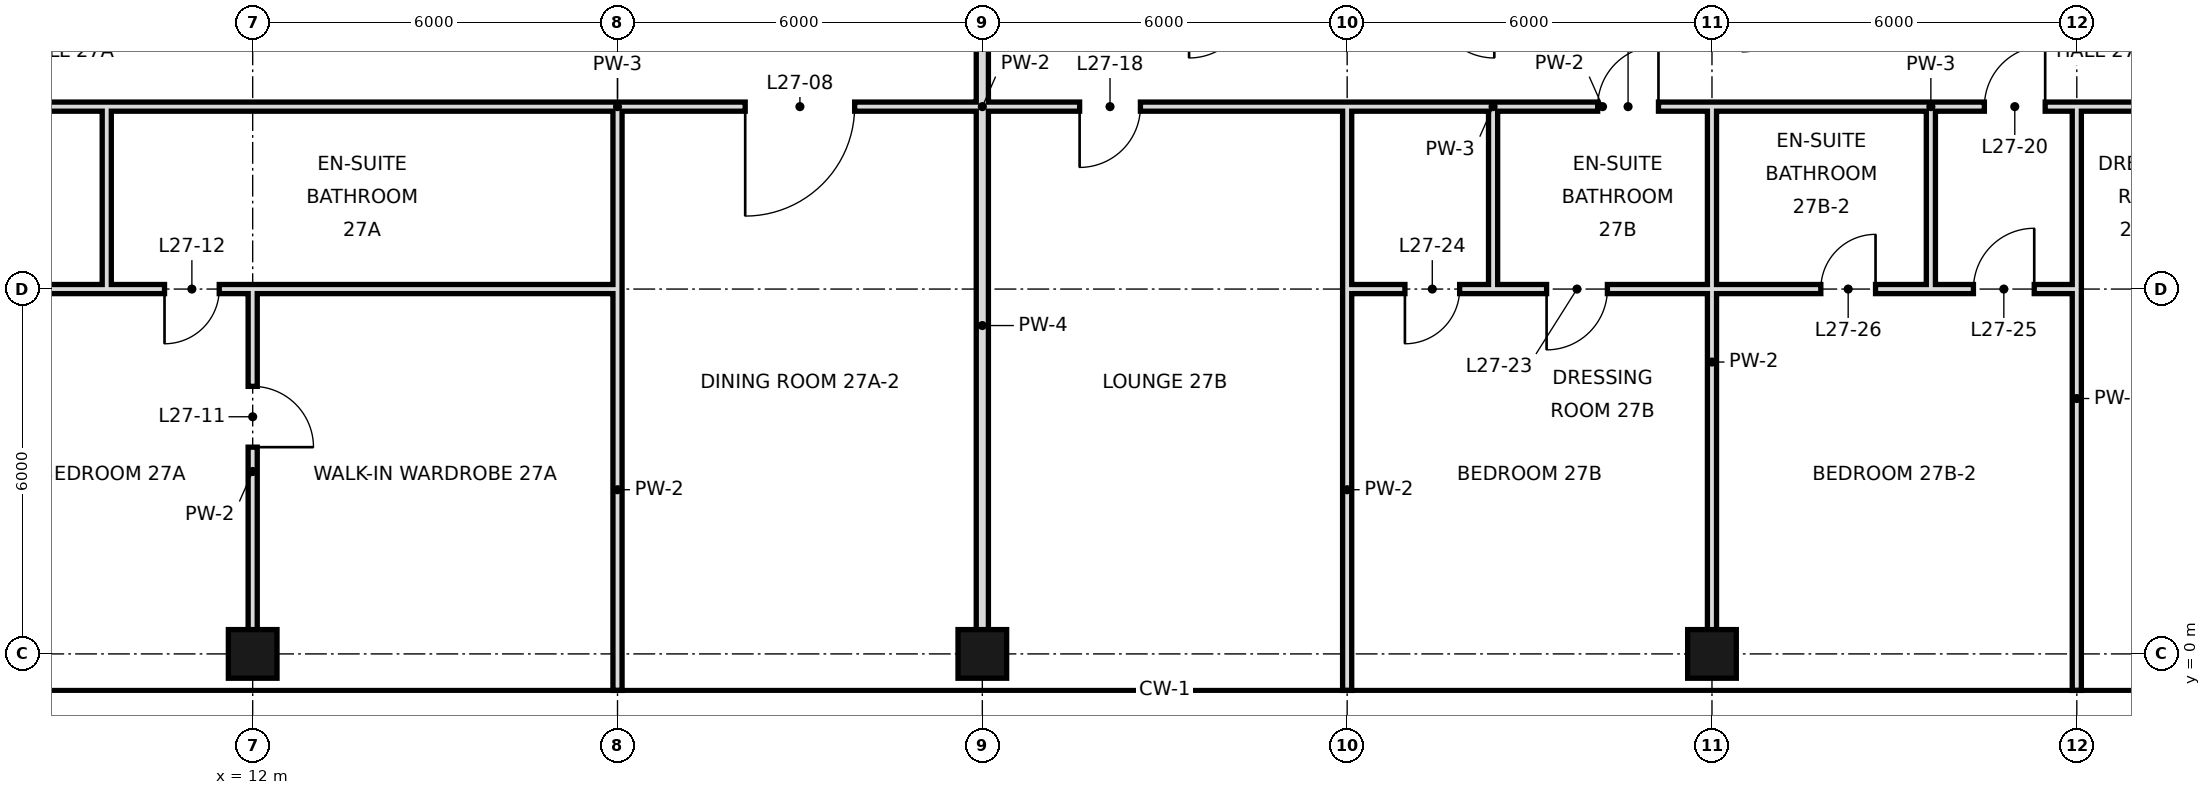
"""IFC4 building model, lengths in metres.
Left out: names, types, materials, properties, quantities, classifications, styles, units other than length and angle.
Written with IfcOpenShell. Run it as: python <this file> out.ifc"""

import sys

from ifc_helpers import new_model, si_unit, direction, frame, frame_2d, origin, origin_2d, place, context, subcontext, project, spatial, rectangle, hollow_rectangle, extrude, element, fill, save


model = new_model("IFC4")
c1 = context("Model", 3, precision=1e-05, world=origin(), true_north=direction((0.0, 1.0)))
c2 = subcontext(c1, "Body", "Model", "MODEL_VIEW")
j1 = project(units=[si_unit("LENGTHUNIT", "METRE"), si_unit("PLANEANGLEUNIT", "RADIAN")], contexts=[c1])
p1 = place(None, origin())
s1 = spatial("IfcSite", under=j1, at=p1, CompositionType="ELEMENT")
p2 = place(p1, origin())
s2 = spatial("IfcBuilding", under=s1, at=p2, CompositionType="ELEMENT")
p3 = place(p2, frame((0.0, 0.0, 123.2)))
s3 = spatial("IfcBuildingStorey", under=s2, at=p3, CompositionType="ELEMENT", Elevation=123.2)
for number, where, z_axis, x_axis in (
    (1, (12.0, 0.0, 0.0), (0.0, 0.0, 1.0), (1.0, 0.0, 0.0)),
    (2, (24.0, 0.0, 0.0), (0.0, 0.0, 1.0), (1.0, 0.0, 0.0)),
    (3, (36.0, 0.0, 0.0), (0.0, 0.0, 1.0), (1.0, 0.0, 0.0)),
):
    element("IfcColumn", number, at=place(p3, frame(where, z_axis=z_axis, x_axis=x_axis)), inside=s3, PredefinedType="COLUMN", context=c2, shape_type="SweptSolid", body=[
        extrude(hollow_rectangle(XDim=0.8, YDim=0.8, WallThickness=0.04, at=origin_2d()), origin(), (0.0, 0.0, 1.0), 3.6),
    ])
p4 = place(p3, frame((12.0, 0.0, 0.0), z_axis=(0.0, 0.0, 1.0), x_axis=(0.0, 1.0, 0.0)))
e4 = element("IfcWall", 4, at=p4, inside=s3, PredefinedType="PARTITIONING", context=c2, shape_type="SweptSolid", body=[
    extrude(rectangle(XDim=6.0, YDim=0.15, at=frame_2d((3.0, 0.0))), origin(), (0.0, 0.0, 1.0), 2.72),
])
p5 = place(p4, frame((3.4, 0.0, 0.0)))
e5 = element("IfcOpeningElement", 5, at=p5, cuts=e4, PredefinedType="OPENING", context=c2, shape_type="SweptSolid", body=[
    extrude(rectangle(XDim=1.0, YDim=2.4, at=frame_2d((0.5, 1.2))), frame((0.0, 0.085, 0.0), z_axis=(0.0, -1.0, 0.0), x_axis=(1.0, 0.0, 0.0)), (0.0, 0.0, 1.0), 0.17),
])
p6 = place(p3, frame((18.0, -0.6, 0.0), z_axis=(0.0, 0.0, 1.0), x_axis=(0.0, 1.0, 0.0)))
e6 = element("IfcWall", 6, at=p6, inside=s3, PredefinedType="PARTITIONING", context=c2, shape_type="SweptSolid", body=[
    extrude(rectangle(XDim=6.6, YDim=0.15, at=frame_2d((3.3, 0.0))), origin(), (0.0, 0.0, 1.0), 2.72),
])
p7 = place(p3, frame((18.0, 6.0, 0.0), z_axis=(0.0, 0.0, 1.0), x_axis=(0.0, 1.0, 0.0)))
e7 = element("IfcWall", 7, at=p7, inside=s3, PredefinedType="PARTITIONING", context=c2, shape_type="SweptSolid", body=[
    extrude(rectangle(XDim=3.0, YDim=0.15, at=frame_2d((1.5, 0.0))), origin(), (0.0, 0.0, 1.0), 2.72),
])
p8 = place(p3, frame((24.0, 0.0, 0.0), z_axis=(0.0, 0.0, 1.0), x_axis=(0.0, 1.0, 0.0)))
e8 = element("IfcWall", 8, at=p8, inside=s3, PredefinedType="SOLIDWALL", context=c2, shape_type="SweptSolid", body=[
    extrude(rectangle(XDim=10.8, YDim=0.2, at=frame_2d((5.4, 0.0))), origin(), (0.0, 0.0, 1.0), 2.72),
])
p9 = place(p3, frame((30.0, -0.6, 0.0), z_axis=(0.0, 0.0, 1.0), x_axis=(0.0, 1.0, 0.0)))
e9 = element("IfcWall", 9, at=p9, inside=s3, PredefinedType="PARTITIONING", context=c2, shape_type="SweptSolid", body=[
    extrude(rectangle(XDim=6.6, YDim=0.15, at=frame_2d((3.3, 0.0))), origin(), (0.0, 0.0, 1.0), 2.72),
])
p10 = place(p3, frame((30.0, 6.0, 0.0), z_axis=(0.0, 0.0, 1.0), x_axis=(0.0, 1.0, 0.0)))
e10 = element("IfcWall", 10, at=p10, inside=s3, PredefinedType="PARTITIONING", context=c2, shape_type="SweptSolid", body=[
    extrude(rectangle(XDim=3.0, YDim=0.15, at=frame_2d((1.5, 0.0))), origin(), (0.0, 0.0, 1.0), 2.72),
])
p11 = place(p3, frame((32.4, 6.0, 0.0), z_axis=(0.0, 0.0, 1.0), x_axis=(0.0, 1.0, 0.0)))
e11 = element("IfcWall", 11, at=p11, inside=s3, PredefinedType="PARTITIONING", context=c2, shape_type="SweptSolid", body=[
    extrude(rectangle(XDim=3.0, YDim=0.15, at=frame_2d((1.5, 0.0))), origin(), (0.0, 0.0, 1.0), 3.42),
])
p12 = place(p3, frame((36.0, 0.0, 0.0), z_axis=(0.0, 0.0, 1.0), x_axis=(0.0, 1.0, 0.0)))
e12 = element("IfcWall", 12, at=p12, inside=s3, PredefinedType="PARTITIONING", context=c2, shape_type="SweptSolid", body=[
    extrude(rectangle(XDim=6.0, YDim=0.15, at=frame_2d((3.0, 0.0))), origin(), (0.0, 0.0, 1.0), 2.72),
])
p13 = place(p3, frame((36.0, 6.0, 0.0), z_axis=(0.0, 0.0, 1.0), x_axis=(0.0, 1.0, 0.0)))
e13 = element("IfcWall", 13, at=p13, inside=s3, PredefinedType="PARTITIONING", context=c2, shape_type="SweptSolid", body=[
    extrude(rectangle(XDim=3.0, YDim=0.15, at=frame_2d((1.5, 0.0))), origin(), (0.0, 0.0, 1.0), 2.72),
])
p14 = place(p3, frame((39.6, 6.0, 0.0), z_axis=(0.0, 0.0, 1.0), x_axis=(0.0, 1.0, 0.0)))
e14 = element("IfcWall", 14, at=p14, inside=s3, PredefinedType="PARTITIONING", context=c2, shape_type="SweptSolid", body=[
    extrude(rectangle(XDim=3.0, YDim=0.15, at=frame_2d((1.5, 0.0))), origin(), (0.0, 0.0, 1.0), 3.42),
])
p15 = place(p3, frame((42.0, -0.6, 0.0), z_axis=(0.0, 0.0, 1.0), x_axis=(0.0, 1.0, 0.0)))
e15 = element("IfcWall", 15, at=p15, inside=s3, PredefinedType="PARTITIONING", context=c2, shape_type="SweptSolid", body=[
    extrude(rectangle(XDim=9.6, YDim=0.15, at=frame_2d((4.8, 0.0))), origin(), (0.0, 0.0, 1.0), 2.72),
])
p16 = place(p3, frame((9.6, 6.0, 0.0), z_axis=(0.0, 0.0, 1.0), x_axis=(0.0, 1.0, 0.0)))
e16 = element("IfcWall", 16, at=p16, inside=s3, PredefinedType="PARTITIONING", context=c2, shape_type="SweptSolid", body=[
    extrude(rectangle(XDim=3.0, YDim=0.15, at=frame_2d((1.5, 0.0))), origin(), (0.0, 0.0, 1.0), 3.42),
])
p17 = place(p3, frame((-6.0, 6.0, 0.0), z_axis=(0.0, 0.0, 1.0), x_axis=(1.0, 0.0, 0.0)))
e17 = element("IfcWall", 17, at=p17, inside=s3, PredefinedType="PARTITIONING", context=c2, shape_type="SweptSolid", body=[
    extrude(rectangle(XDim=15.6, YDim=0.15, at=frame_2d((7.8, 0.0))), origin(), (0.0, 0.0, 1.0), 2.97),
])
p18 = place(p17, frame((3.16, 0.0, 0.0)))
e18 = element("IfcOpeningElement", 18, at=p18, cuts=e17, PredefinedType="OPENING", context=c2, shape_type="SweptSolid", body=[
    extrude(rectangle(XDim=1.8, YDim=2.4, at=frame_2d((0.9, 1.2))), frame((0.0, 0.085, 0.0), z_axis=(0.0, -1.0, 0.0), x_axis=(1.0, 0.0, 0.0)), (0.0, 0.0, 1.0), 0.17),
])
p19 = place(p17, frame((12.88, 0.0, 0.0)))
e19 = element("IfcOpeningElement", 19, at=p19, cuts=e17, PredefinedType="OPENING", context=c2, shape_type="SweptSolid", body=[
    extrude(rectangle(XDim=1.0, YDim=2.4, at=frame_2d((0.5, 1.2))), frame((0.0, 0.085, 0.0), z_axis=(0.0, -1.0, 0.0), x_axis=(1.0, 0.0, 0.0)), (0.0, 0.0, 1.0), 0.17),
])
p20 = place(p3, frame((32.4, 6.0, 0.0), z_axis=(0.0, 0.0, 1.0), x_axis=(1.0, 0.0, 0.0)))
e20 = element("IfcWall", 20, at=p20, inside=s3, PredefinedType="PARTITIONING", context=c2, shape_type="SweptSolid", body=[
    extrude(rectangle(XDim=3.6, YDim=0.15, at=frame_2d((1.8, 0.0))), origin(), (0.0, 0.0, 1.0), 2.97),
])
p21 = place(p20, frame((0.88, 0.0, 0.0)))
e21 = element("IfcOpeningElement", 21, at=p21, cuts=e20, PredefinedType="OPENING", context=c2, shape_type="SweptSolid", body=[
    extrude(rectangle(XDim=1.0, YDim=2.4, at=frame_2d((0.5, 1.2))), frame((0.0, 0.085, 0.0), z_axis=(0.0, -1.0, 0.0), x_axis=(1.0, 0.0, 0.0)), (0.0, 0.0, 1.0), 0.17),
])
p22 = place(p3, frame((39.6, 6.0, 0.0), z_axis=(0.0, 0.0, 1.0), x_axis=(1.0, 0.0, 0.0)))
e22 = element("IfcWall", 22, at=p22, inside=s3, PredefinedType="PARTITIONING", context=c2, shape_type="SweptSolid", body=[
    extrude(rectangle(XDim=2.4, YDim=0.15, at=frame_2d((1.2, 0.0))), origin(), (0.0, 0.0, 1.0), 2.97),
])
p23 = place(p22, frame((0.7, 0.0, 0.0)))
e23 = element("IfcOpeningElement", 23, at=p23, cuts=e22, PredefinedType="OPENING", context=c2, shape_type="SweptSolid", body=[
    extrude(rectangle(XDim=1.0, YDim=2.4, at=frame_2d((0.5, 1.2))), frame((0.0, 0.085, 0.0), z_axis=(0.0, -1.0, 0.0), x_axis=(1.0, 0.0, 0.0)), (0.0, 0.0, 1.0), 0.17),
])
p24 = place(p3, frame((9.6, 6.0, 0.0), z_axis=(0.0, 0.0, 1.0), x_axis=(1.0, 0.0, 0.0)))
e24 = element("IfcWall", 24, at=p24, inside=s3, PredefinedType="PARTITIONING", context=c2, shape_type="SweptSolid", body=[
    extrude(rectangle(XDim=8.4, YDim=0.15, at=frame_2d((4.2, 0.0))), origin(), (0.0, 0.0, 1.0), 2.97),
])
p25 = place(p24, frame((0.95, 0.0, 0.0)))
e25 = element("IfcOpeningElement", 25, at=p25, cuts=e24, PredefinedType="OPENING", context=c2, shape_type="SweptSolid", body=[
    extrude(rectangle(XDim=0.9, YDim=2.4, at=frame_2d((0.45, 1.2))), frame((0.0, 0.085, 0.0), z_axis=(0.0, -1.0, 0.0), x_axis=(1.0, 0.0, 0.0)), (0.0, 0.0, 1.0), 0.17),
])
p26 = place(p3, frame((30.0, 6.0, 0.0), z_axis=(0.0, 0.0, 1.0), x_axis=(1.0, 0.0, 0.0)))
e26 = element("IfcWall", 26, at=p26, inside=s3, PredefinedType="PARTITIONING", context=c2, shape_type="SweptSolid", body=[
    extrude(rectangle(XDim=2.4, YDim=0.15, at=frame_2d((1.2, 0.0))), origin(), (0.0, 0.0, 1.0), 2.97),
])
p27 = place(p26, frame((0.95, 0.0, 0.0)))
e27 = element("IfcOpeningElement", 27, at=p27, cuts=e26, PredefinedType="OPENING", context=c2, shape_type="SweptSolid", body=[
    extrude(rectangle(XDim=0.9, YDim=2.4, at=frame_2d((0.45, 1.2))), frame((0.0, 0.085, 0.0), z_axis=(0.0, -1.0, 0.0), x_axis=(1.0, 0.0, 0.0)), (0.0, 0.0, 1.0), 0.17),
])
p28 = place(p3, frame((36.0, 6.0, 0.0), z_axis=(0.0, 0.0, 1.0), x_axis=(1.0, 0.0, 0.0)))
e28 = element("IfcWall", 28, at=p28, inside=s3, PredefinedType="PARTITIONING", context=c2, shape_type="SweptSolid", body=[
    extrude(rectangle(XDim=3.6, YDim=0.15, at=frame_2d((1.8, 0.0))), origin(), (0.0, 0.0, 1.0), 2.97),
])
p29 = place(p28, frame((1.79, 0.0, 0.0)))
e29 = element("IfcOpeningElement", 29, at=p29, cuts=e28, PredefinedType="OPENING", context=c2, shape_type="SweptSolid", body=[
    extrude(rectangle(XDim=0.9, YDim=2.4, at=frame_2d((0.45, 1.2))), frame((0.0, 0.085, 0.0), z_axis=(0.0, -1.0, 0.0), x_axis=(1.0, 0.0, 0.0)), (0.0, 0.0, 1.0), 0.17),
])
p30 = place(p3, frame((-6.6, 9.0, 0.0), z_axis=(0.0, 0.0, 1.0), x_axis=(1.0, 0.0, 0.0)))
e30 = element("IfcWall", 30, at=p30, inside=s3, PredefinedType="PARTITIONING", context=c2, shape_type="SweptSolid", body=[
    extrude(rectangle(XDim=16.2, YDim=0.15, at=frame_2d((8.1, 0.0))), origin(), (0.0, 0.0, 1.0), 3.42),
])
p31 = place(p30, frame((5.7, 0.0, 0.0)))
e31 = element("IfcOpeningElement", 31, at=p31, cuts=e30, PredefinedType="OPENING", context=c2, shape_type="SweptSolid", body=[
    extrude(rectangle(XDim=1.8, YDim=2.4, at=frame_2d((0.9, 1.2))), frame((0.0, 0.085, 0.0), z_axis=(0.0, -1.0, 0.0), x_axis=(1.0, 0.0, 0.0)), (0.0, 0.0, 1.0), 0.17),
])
p32 = place(p30, frame((13.48, 0.0, 0.0)))
e32 = element("IfcOpeningElement", 32, at=p32, cuts=e30, PredefinedType="OPENING", context=c2, shape_type="SweptSolid", body=[
    extrude(rectangle(XDim=1.0, YDim=2.4, at=frame_2d((0.5, 1.2))), frame((0.0, 0.085, 0.0), z_axis=(0.0, -1.0, 0.0), x_axis=(1.0, 0.0, 0.0)), (0.0, 0.0, 1.0), 0.17),
])
p33 = place(p3, frame((18.0, 9.0, 0.0), z_axis=(0.0, 0.0, 1.0), x_axis=(1.0, 0.0, 0.0)))
e33 = element("IfcWall", 33, at=p33, inside=s3, PredefinedType="PARTITIONING", context=c2, shape_type="SweptSolid", body=[
    extrude(rectangle(XDim=12.0, YDim=0.15, at=frame_2d((6.0, 0.0))), origin(), (0.0, 0.0, 1.0), 3.42),
])
p34 = place(p33, frame((2.1, 0.0, 0.0)))
e34 = element("IfcOpeningElement", 34, at=p34, cuts=e33, PredefinedType="OPENING", context=c2, shape_type="SweptSolid", body=[
    extrude(rectangle(XDim=1.8, YDim=2.4, at=frame_2d((0.9, 1.2))), frame((0.0, 0.085, 0.0), z_axis=(0.0, -1.0, 0.0), x_axis=(1.0, 0.0, 0.0)), (0.0, 0.0, 1.0), 0.17),
])
p35 = place(p33, frame((7.6, 0.0, 0.0)))
e35 = element("IfcOpeningElement", 35, at=p35, cuts=e33, PredefinedType="OPENING", context=c2, shape_type="SweptSolid", body=[
    extrude(rectangle(XDim=1.0, YDim=2.4, at=frame_2d((0.5, 1.2))), frame((0.0, 0.085, 0.0), z_axis=(0.0, -1.0, 0.0), x_axis=(1.0, 0.0, 0.0)), (0.0, 0.0, 1.0), 0.17),
])
p36 = place(p3, frame((32.4, 9.0, 0.0), z_axis=(0.0, 0.0, 1.0), x_axis=(1.0, 0.0, 0.0)))
e36 = element("IfcWall", 36, at=p36, inside=s3, PredefinedType="PARTITIONING", context=c2, shape_type="SweptSolid", body=[
    extrude(rectangle(XDim=3.6, YDim=0.15, at=frame_2d((1.8, 0.0))), origin(), (0.0, 0.0, 1.0), 3.42),
])
p37 = place(p36, frame((1.72, 0.0, 0.0)))
e37 = element("IfcOpeningElement", 37, at=p37, cuts=e36, PredefinedType="OPENING", context=c2, shape_type="SweptSolid", body=[
    extrude(rectangle(XDim=1.0, YDim=2.4, at=frame_2d((0.5, 1.2))), frame((0.0, 0.085, 0.0), z_axis=(0.0, -1.0, 0.0), x_axis=(1.0, 0.0, 0.0)), (0.0, 0.0, 1.0), 0.17),
])
p38 = place(p3, frame((39.6, 9.0, 0.0), z_axis=(0.0, 0.0, 1.0), x_axis=(1.0, 0.0, 0.0)))
e38 = element("IfcWall", 38, at=p38, inside=s3, PredefinedType="PARTITIONING", context=c2, shape_type="SweptSolid", body=[
    extrude(rectangle(XDim=21.0, YDim=0.15, at=frame_2d((10.5, 0.0))), origin(), (0.0, 0.0, 1.0), 3.42),
])
p39 = place(p38, frame((0.88, 0.0, 0.0)))
e39 = element("IfcOpeningElement", 39, at=p39, cuts=e38, PredefinedType="OPENING", context=c2, shape_type="SweptSolid", body=[
    extrude(rectangle(XDim=1.0, YDim=2.4, at=frame_2d((0.5, 1.2))), frame((0.0, 0.085, 0.0), z_axis=(0.0, -1.0, 0.0), x_axis=(1.0, 0.0, 0.0)), (0.0, 0.0, 1.0), 0.17),
])
p40 = place(p38, frame((4.9, 0.0, 0.0)))
e40 = element("IfcOpeningElement", 40, at=p40, cuts=e38, PredefinedType="OPENING", context=c2, shape_type="SweptSolid", body=[
    extrude(rectangle(XDim=1.0, YDim=2.4, at=frame_2d((0.5, 1.2))), frame((0.0, 0.085, 0.0), z_axis=(0.0, -1.0, 0.0), x_axis=(1.0, 0.0, 0.0)), (0.0, 0.0, 1.0), 0.17),
])
p41 = place(p38, frame((8.65, 0.0, 0.0)))
e41 = element("IfcOpeningElement", 41, at=p41, cuts=e38, PredefinedType="OPENING", context=c2, shape_type="SweptSolid", body=[
    extrude(rectangle(XDim=1.8, YDim=2.4, at=frame_2d((0.9, 1.2))), frame((0.0, 0.085, 0.0), z_axis=(0.0, -1.0, 0.0), x_axis=(1.0, 0.0, 0.0)), (0.0, 0.0, 1.0), 0.17),
])
p42 = place(p3, frame((9.6, 9.0, 0.0), z_axis=(0.0, 0.0, 1.0), x_axis=(1.0, 0.0, 0.0)))
e42 = element("IfcWall", 42, at=p42, inside=s3, PredefinedType="PARTITIONING", context=c2, shape_type="SweptSolid", body=[
    extrude(rectangle(XDim=8.4, YDim=0.15, at=frame_2d((4.2, 0.0))), origin(), (0.0, 0.0, 1.0), 3.42),
])
p43 = place(p3, frame((30.0, 9.0, 0.0), z_axis=(0.0, 0.0, 1.0), x_axis=(1.0, 0.0, 0.0)))
e43 = element("IfcWall", 43, at=p43, inside=s3, PredefinedType="PARTITIONING", context=c2, shape_type="SweptSolid", body=[
    extrude(rectangle(XDim=2.4, YDim=0.15, at=frame_2d((1.2, 0.0))), origin(), (0.0, 0.0, 1.0), 3.42),
])
p44 = place(p3, frame((36.0, 9.0, 0.0), z_axis=(0.0, 0.0, 1.0), x_axis=(1.0, 0.0, 0.0)))
e44 = element("IfcWall", 44, at=p44, inside=s3, PredefinedType="PARTITIONING", context=c2, shape_type="SweptSolid", body=[
    extrude(rectangle(XDim=3.6, YDim=0.15, at=frame_2d((1.8, 0.0))), origin(), (0.0, 0.0, 1.0), 3.42),
])
p45 = place(p34, frame((1.8, 0.0, 0.0), z_axis=(0.0, 0.0, 1.0), x_axis=(-1.0, 0.0, 0.0)))
e45 = element("IfcDoor", 45, at=p45, inside=s3, OperationType="SINGLE_SWING_RIGHT", PredefinedType="DOOR", context=c2, shape_type="SweptSolid", body=[
    extrude(rectangle(XDim=1.8, YDim=2.4, at=frame_2d((0.9, 1.2))), frame((0.0, 0.025, 0.0), z_axis=(0.0, -1.0, 0.0), x_axis=(1.0, 0.0, 0.0)), (0.0, 0.0, 1.0), 0.05),
])
fill(e34, e45)
p46 = place(p5, frame((1.0, 0.0, 0.0), z_axis=(0.0, 0.0, 1.0), x_axis=(-1.0, 0.0, 0.0)))
e46 = element("IfcDoor", 46, at=p46, inside=s3, OperationType="SINGLE_SWING_RIGHT", PredefinedType="DOOR", context=c2, shape_type="SweptSolid", body=[
    extrude(rectangle(XDim=1.0, YDim=2.4, at=frame_2d((0.5, 1.2))), frame((0.0, 0.025, 0.0), z_axis=(0.0, -1.0, 0.0), x_axis=(1.0, 0.0, 0.0)), (0.0, 0.0, 1.0), 0.05),
])
fill(e5, e46)
p47 = place(p25, frame((0.9, 0.0, 0.0), z_axis=(0.0, 0.0, 1.0), x_axis=(-1.0, 0.0, 0.0)))
e47 = element("IfcDoor", 47, at=p47, inside=s3, OperationType="SINGLE_SWING_RIGHT", PredefinedType="DOOR", context=c2, shape_type="SweptSolid", body=[
    extrude(rectangle(XDim=0.9, YDim=2.4, at=frame_2d((0.45, 1.2))), frame((0.0, 0.025, 0.0), z_axis=(0.0, -1.0, 0.0), x_axis=(1.0, 0.0, 0.0)), (0.0, 0.0, 1.0), 0.05),
])
fill(e25, e47)
p48 = place(p35, frame((1.0, 0.0, 0.0), z_axis=(0.0, 0.0, 1.0), x_axis=(-1.0, 0.0, 0.0)))
e48 = element("IfcDoor", 48, at=p48, inside=s3, OperationType="SINGLE_SWING_RIGHT", PredefinedType="DOOR", context=c2, shape_type="SweptSolid", body=[
    extrude(rectangle(XDim=1.0, YDim=2.4, at=frame_2d((0.5, 1.2))), frame((0.0, 0.025, 0.0), z_axis=(0.0, -1.0, 0.0), x_axis=(1.0, 0.0, 0.0)), (0.0, 0.0, 1.0), 0.05),
])
fill(e35, e48)
p49 = place(p37, frame((1.0, 0.0, 0.0), z_axis=(0.0, 0.0, 1.0), x_axis=(-1.0, 0.0, 0.0)))
e49 = element("IfcDoor", 49, at=p49, inside=s3, OperationType="SINGLE_SWING_LEFT", PredefinedType="DOOR", context=c2, shape_type="SweptSolid", body=[
    extrude(rectangle(XDim=1.0, YDim=2.4, at=frame_2d((0.5, 1.2))), frame((0.0, 0.025, 0.0), z_axis=(0.0, -1.0, 0.0), x_axis=(1.0, 0.0, 0.0)), (0.0, 0.0, 1.0), 0.05),
])
fill(e37, e49)
p50 = place(p39, frame((1.0, 0.0, 0.0), z_axis=(0.0, 0.0, 1.0), x_axis=(-1.0, 0.0, 0.0)))
e50 = element("IfcDoor", 50, at=p50, inside=s3, OperationType="SINGLE_SWING_LEFT", PredefinedType="DOOR", context=c2, shape_type="SweptSolid", body=[
    extrude(rectangle(XDim=1.0, YDim=2.4, at=frame_2d((0.5, 1.2))), frame((0.0, 0.025, 0.0), z_axis=(0.0, -1.0, 0.0), x_axis=(1.0, 0.0, 0.0)), (0.0, 0.0, 1.0), 0.05),
])
fill(e39, e50)
p51 = place(p21, frame((1.0, 0.0, 0.0), z_axis=(0.0, 0.0, 1.0), x_axis=(-1.0, 0.0, 0.0)))
e51 = element("IfcDoor", 51, at=p51, inside=s3, OperationType="SINGLE_SWING_RIGHT", PredefinedType="DOOR", context=c2, shape_type="SweptSolid", body=[
    extrude(rectangle(XDim=1.0, YDim=2.4, at=frame_2d((0.5, 1.2))), frame((0.0, 0.025, 0.0), z_axis=(0.0, -1.0, 0.0), x_axis=(1.0, 0.0, 0.0)), (0.0, 0.0, 1.0), 0.05),
])
fill(e21, e51)
p52 = place(p27, frame((0.9, 0.0, 0.0), z_axis=(0.0, 0.0, 1.0), x_axis=(-1.0, 0.0, 0.0)))
e52 = element("IfcDoor", 52, at=p52, inside=s3, OperationType="SINGLE_SWING_RIGHT", PredefinedType="DOOR", context=c2, shape_type="SweptSolid", body=[
    extrude(rectangle(XDim=0.9, YDim=2.4, at=frame_2d((0.45, 1.2))), frame((0.0, 0.025, 0.0), z_axis=(0.0, -1.0, 0.0), x_axis=(1.0, 0.0, 0.0)), (0.0, 0.0, 1.0), 0.05),
])
fill(e27, e52)
p53 = place(p23, frame((1.0, 0.0, 0.0), z_axis=(0.0, 0.0, 1.0), x_axis=(-1.0, 0.0, 0.0)))
e53 = element("IfcDoor", 53, at=p53, inside=s3, OperationType="SINGLE_SWING_LEFT", PredefinedType="DOOR", context=c2, shape_type="SweptSolid", body=[
    extrude(rectangle(XDim=1.0, YDim=2.4, at=frame_2d((0.5, 1.2))), frame((0.0, 0.025, 0.0), z_axis=(0.0, -1.0, 0.0), x_axis=(1.0, 0.0, 0.0)), (0.0, 0.0, 1.0), 0.05),
])
fill(e23, e53)
p54 = place(p29, frame((0.9, 0.0, 0.0), z_axis=(0.0, 0.0, 1.0), x_axis=(-1.0, 0.0, 0.0)))
e54 = element("IfcDoor", 54, at=p54, inside=s3, OperationType="SINGLE_SWING_LEFT", PredefinedType="DOOR", context=c2, shape_type="SweptSolid", body=[
    extrude(rectangle(XDim=0.9, YDim=2.4, at=frame_2d((0.45, 1.2))), frame((0.0, 0.025, 0.0), z_axis=(0.0, -1.0, 0.0), x_axis=(1.0, 0.0, 0.0)), (0.0, 0.0, 1.0), 0.05),
])
fill(e29, e54)
save(model, sys.argv[1])
